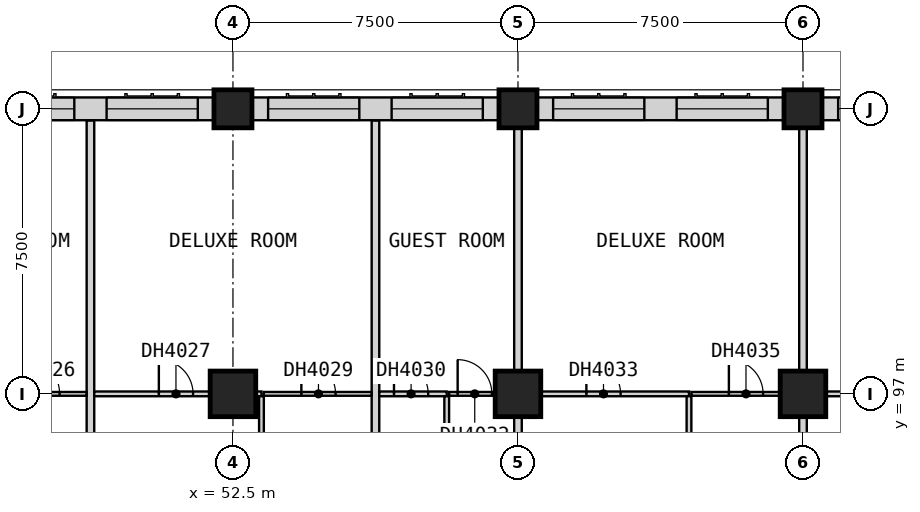
"""IFC4 building model, lengths in metres.
Left out: names, types, materials, properties, quantities, classifications, styles, units other than length and angle.
Written with IfcOpenShell. Run it as: python <this file> out.ifc"""

import sys

from ifc_helpers import new_model, si_unit, direction, frame, frame_2d, origin, origin_2d, place, context, subcontext, project, spatial, rectangle, extrude, element, fill, save


model = new_model("IFC4")
c1 = context("Model", 3, precision=1e-05, world=origin(), true_north=direction((0.0, 1.0)))
c2 = subcontext(c1, "Body", "Model", "MODEL_VIEW")
j1 = project(units=[si_unit("LENGTHUNIT", "METRE"), si_unit("PLANEANGLEUNIT", "RADIAN")], contexts=[c1])
p1 = place(None, origin())
s1 = spatial("IfcSite", under=j1, at=p1, CompositionType="ELEMENT")
p2 = place(p1, origin())
s2 = spatial("IfcBuilding", under=s1, at=p2, CompositionType="ELEMENT")
p3 = place(p2, frame((0.0, 0.0, 44.8)))
s3 = spatial("IfcBuildingStorey", under=s2, at=p3, CompositionType="ELEMENT", Elevation=44.8)
p4 = place(p3, frame((52.5, 97.0, 0.0), z_axis=(0.0, 0.0, 1.0), x_axis=(1.0, 0.0, 0.0)))
e1 = element("IfcColumn", 1, at=p4, inside=s3, PredefinedType="COLUMN", context=c2, shape_type="SweptSolid", body=[
    extrude(rectangle(XDim=1.2, YDim=1.2, at=origin_2d()), origin(), (0.0, 0.0, 1.0), 3.6),
])
p5 = place(p3, frame((52.5, 104.5, 0.0), z_axis=(0.0, 0.0, 1.0), x_axis=(1.0, 0.0, 0.0)))
e2 = element("IfcColumn", 2, at=p5, inside=s3, PredefinedType="COLUMN", context=c2, shape_type="SweptSolid", body=[
    extrude(rectangle(XDim=1.0, YDim=1.0, at=origin_2d()), origin(), (0.0, 0.0, 1.0), 3.6),
])
p6 = place(p3, frame((60.0, 97.0, 0.0), z_axis=(0.0, 0.0, 1.0), x_axis=(1.0, 0.0, 0.0)))
e3 = element("IfcColumn", 3, at=p6, inside=s3, PredefinedType="COLUMN", context=c2, shape_type="SweptSolid", body=[
    extrude(rectangle(XDim=1.2, YDim=1.2, at=origin_2d()), origin(), (0.0, 0.0, 1.0), 3.6),
])
p7 = place(p3, frame((60.0, 104.5, 0.0), z_axis=(0.0, 0.0, 1.0), x_axis=(1.0, 0.0, 0.0)))
e4 = element("IfcColumn", 4, at=p7, inside=s3, PredefinedType="COLUMN", context=c2, shape_type="SweptSolid", body=[
    extrude(rectangle(XDim=1.0, YDim=1.0, at=origin_2d()), origin(), (0.0, 0.0, 1.0), 3.6),
])
p8 = place(p3, frame((67.5, 97.0, 0.0), z_axis=(0.0, 0.0, 1.0), x_axis=(1.0, 0.0, 0.0)))
e5 = element("IfcColumn", 5, at=p8, inside=s3, PredefinedType="COLUMN", context=c2, shape_type="SweptSolid", body=[
    extrude(rectangle(XDim=1.2, YDim=1.2, at=origin_2d()), origin(), (0.0, 0.0, 1.0), 3.6),
])
p9 = place(p3, frame((67.5, 104.5, 0.0), z_axis=(0.0, 0.0, 1.0), x_axis=(1.0, 0.0, 0.0)))
e6 = element("IfcColumn", 6, at=p9, inside=s3, PredefinedType="COLUMN", context=c2, shape_type="SweptSolid", body=[
    extrude(rectangle(XDim=1.0, YDim=1.0, at=origin_2d()), origin(), (0.0, 0.0, 1.0), 3.6),
])
p10 = place(p3, frame((74.0, 104.5, 0.0), z_axis=(0.0, 0.0, 1.0), x_axis=(-1.0, 0.0, 0.0)))
e7 = element("IfcWall", 7, at=p10, inside=s3, PredefinedType="SOLIDWALL", context=c2, shape_type="SweptSolid", body=[
    extrude(rectangle(XDim=6.0, YDim=0.6, at=frame_2d((3.0, 0.0))), origin(), (0.0, 0.0, 1.0), 2.85),
])
p11 = place(p10, frame((3.175, 0.0, 0.8)))
e8 = element("IfcOpeningElement", 8, at=p11, cuts=e7, PredefinedType="OPENING", context=c2, shape_type="SweptSolid", body=[
    extrude(rectangle(XDim=2.4, YDim=1.8, at=frame_2d((1.2, 0.9))), frame((0.0, 0.31, 0.0), z_axis=(0.0, -1.0, 0.0), x_axis=(1.0, 0.0, 0.0)), (0.0, 0.0, 1.0), 0.62),
])
p12 = place(p10, frame((0.175, 0.0, 0.8)))
e9 = element("IfcOpeningElement", 9, at=p12, cuts=e7, PredefinedType="OPENING", context=c2, shape_type="SweptSolid", body=[
    extrude(rectangle(XDim=2.4, YDim=1.8, at=frame_2d((1.2, 0.9))), frame((0.0, 0.31, 0.0), z_axis=(0.0, -1.0, 0.0), x_axis=(1.0, 0.0, 0.0)), (0.0, 0.0, 1.0), 0.62),
])
p13 = place(p3, frame((67.0, 104.5, 0.0), z_axis=(0.0, 0.0, 1.0), x_axis=(-1.0, 0.0, 0.0)))
e10 = element("IfcWall", 10, at=p13, inside=s3, PredefinedType="SOLIDWALL", context=c2, shape_type="SweptSolid", body=[
    extrude(rectangle(XDim=6.5, YDim=0.6, at=frame_2d((3.25, 0.0))), origin(), (0.0, 0.0, 1.0), 2.85),
])
p14 = place(p13, frame((3.675, 0.0, 0.8)))
e11 = element("IfcOpeningElement", 11, at=p14, cuts=e10, PredefinedType="OPENING", context=c2, shape_type="SweptSolid", body=[
    extrude(rectangle(XDim=2.4, YDim=1.8, at=frame_2d((1.2, 0.9))), frame((0.0, 0.31, 0.0), z_axis=(0.0, -1.0, 0.0), x_axis=(1.0, 0.0, 0.0)), (0.0, 0.0, 1.0), 0.62),
])
p15 = place(p13, frame((0.425, 0.0, 0.8)))
e12 = element("IfcOpeningElement", 12, at=p15, cuts=e10, PredefinedType="OPENING", context=c2, shape_type="SweptSolid", body=[
    extrude(rectangle(XDim=2.4, YDim=1.8, at=frame_2d((1.2, 0.9))), frame((0.0, 0.31, 0.0), z_axis=(0.0, -1.0, 0.0), x_axis=(1.0, 0.0, 0.0)), (0.0, 0.0, 1.0), 0.62),
])
p16 = place(p3, frame((59.5, 104.5, 0.0), z_axis=(0.0, 0.0, 1.0), x_axis=(-1.0, 0.0, 0.0)))
e13 = element("IfcWall", 13, at=p16, inside=s3, PredefinedType="SOLIDWALL", context=c2, shape_type="SweptSolid", body=[
    extrude(rectangle(XDim=6.5, YDim=0.6, at=frame_2d((3.25, 0.0))), origin(), (0.0, 0.0, 1.0), 2.85),
])
p17 = place(p16, frame((3.675, 0.0, 0.8)))
e14 = element("IfcOpeningElement", 14, at=p17, cuts=e13, PredefinedType="OPENING", context=c2, shape_type="SweptSolid", body=[
    extrude(rectangle(XDim=2.4, YDim=1.8, at=frame_2d((1.2, 0.9))), frame((0.0, 0.31, 0.0), z_axis=(0.0, -1.0, 0.0), x_axis=(1.0, 0.0, 0.0)), (0.0, 0.0, 1.0), 0.62),
])
p18 = place(p16, frame((0.425, 0.0, 0.8)))
e15 = element("IfcOpeningElement", 15, at=p18, cuts=e13, PredefinedType="OPENING", context=c2, shape_type="SweptSolid", body=[
    extrude(rectangle(XDim=2.4, YDim=1.8, at=frame_2d((1.2, 0.9))), frame((0.0, 0.31, 0.0), z_axis=(0.0, -1.0, 0.0), x_axis=(1.0, 0.0, 0.0)), (0.0, 0.0, 1.0), 0.62),
])
p19 = place(p3, frame((52.0, 104.5, 0.0), z_axis=(0.0, 0.0, 1.0), x_axis=(-1.0, 0.0, 0.0)))
e16 = element("IfcWall", 16, at=p19, inside=s3, PredefinedType="SOLIDWALL", context=c2, shape_type="SweptSolid", body=[
    extrude(rectangle(XDim=6.5, YDim=0.6, at=frame_2d((3.25, 0.0))), origin(), (0.0, 0.0, 1.0), 2.85),
])
p20 = place(p19, frame((3.675, 0.0, 0.8)))
e17 = element("IfcOpeningElement", 17, at=p20, cuts=e16, PredefinedType="OPENING", context=c2, shape_type="SweptSolid", body=[
    extrude(rectangle(XDim=2.4, YDim=1.8, at=frame_2d((1.2, 0.9))), frame((0.0, 0.31, 0.0), z_axis=(0.0, -1.0, 0.0), x_axis=(1.0, 0.0, 0.0)), (0.0, 0.0, 1.0), 0.62),
])
p21 = place(p19, frame((0.425, 0.0, 0.8)))
e18 = element("IfcOpeningElement", 18, at=p21, cuts=e16, PredefinedType="OPENING", context=c2, shape_type="SweptSolid", body=[
    extrude(rectangle(XDim=2.4, YDim=1.8, at=frame_2d((1.2, 0.9))), frame((0.0, 0.31, 0.0), z_axis=(0.0, -1.0, 0.0), x_axis=(1.0, 0.0, 0.0)), (0.0, 0.0, 1.0), 0.62),
])
for number, where, z_axis, x_axis in (
    (19, (48.75, 92.475, 0.0), (0.0, 0.0, 1.0), (0.0, 1.0, 0.0)),
    (20, (56.25, 92.475, 0.0), (0.0, 0.0, 1.0), (0.0, 1.0, 0.0)),
):
    element("IfcWall", number, at=place(p3, frame(where, z_axis=z_axis, x_axis=x_axis)), inside=s3, PredefinedType="PARTITIONING", context=c2, shape_type="SweptSolid", body=[
        extrude(rectangle(XDim=11.715, YDim=0.2, at=frame_2d((5.857, 0.0))), origin(), (0.0, 0.0, 1.0), 3.35),
    ])
for number, where, z_axis, x_axis in (
    (21, (60.0, 92.475, 0.0), (0.0, 0.0, 1.0), (0.0, 1.0, 0.0)),
    (22, (67.5, 92.475, 0.0), (0.0, 0.0, 1.0), (0.0, 1.0, 0.0)),
):
    element("IfcWall", number, at=place(p3, frame(where, z_axis=z_axis, x_axis=x_axis)), inside=s3, PredefinedType="PARTITIONING", context=c2, shape_type="SweptSolid", body=[
        extrude(rectangle(XDim=12.525, YDim=0.2, at=frame_2d((6.262, 0.0))), origin(), (0.0, 0.0, 1.0), 3.35),
    ])
p22 = place(p3, frame((46.188, 97.0, 0.0), z_axis=(0.0, 0.0, 1.0), x_axis=(1.0, 0.0, 0.0)))
e23 = element("IfcWall", 23, at=p22, inside=s3, PredefinedType="PARTITIONING", context=c2, shape_type="SweptSolid", body=[
    extrude(rectangle(XDim=2.462, YDim=0.1, at=frame_2d((1.231, 0.0))), origin(), (0.0, 0.0, 1.0), 3.35),
])
p23 = place(p22, frame((0.75, 0.0, 0.0)))
e24 = element("IfcOpeningElement", 24, at=p23, cuts=e23, PredefinedType="OPENING", context=c2, shape_type="SweptSolid", body=[
    extrude(rectangle(XDim=1.0, YDim=2.1, at=frame_2d((0.5, 1.05))), frame((0.0, 0.06, 0.0), z_axis=(0.0, -1.0, 0.0), x_axis=(1.0, 0.0, 0.0)), (0.0, 0.0, 1.0), 0.12),
])
p24 = place(p3, frame((53.312, 97.0, 0.0), z_axis=(0.0, 0.0, 1.0), x_axis=(1.0, 0.0, 0.0)))
e25 = element("IfcWall", 25, at=p24, inside=s3, PredefinedType="PARTITIONING", context=c2, shape_type="SweptSolid", body=[
    extrude(rectangle(XDim=2.837, YDim=0.1, at=frame_2d((1.419, 0.0))), origin(), (0.0, 0.0, 1.0), 3.35),
])
p25 = place(p24, frame((0.988, 0.0, 0.0)))
e26 = element("IfcOpeningElement", 26, at=p25, cuts=e25, PredefinedType="OPENING", context=c2, shape_type="SweptSolid", body=[
    extrude(rectangle(XDim=0.9, YDim=2.1, at=frame_2d((0.45, 1.05))), frame((0.0, 0.06, 0.0), z_axis=(0.0, -1.0, 0.0), x_axis=(1.0, 0.0, 0.0)), (0.0, 0.0, 1.0), 0.12),
])
p26 = place(p3, frame((58.188, 97.0, 0.0), z_axis=(0.0, 0.0, 1.0), x_axis=(1.0, 0.0, 0.0)))
e27 = element("IfcWall", 27, at=p26, inside=s3, PredefinedType="PARTITIONING", context=c2, shape_type="SweptSolid", body=[
    extrude(rectangle(XDim=1.712, YDim=0.1, at=frame_2d((0.856, 0.0))), origin(), (0.0, 0.0, 1.0), 3.35),
])
p27 = place(p26, frame((0.225, 0.0, 0.0)))
e28 = element("IfcOpeningElement", 28, at=p27, cuts=e27, PredefinedType="OPENING", context=c2, shape_type="SweptSolid", body=[
    extrude(rectangle(XDim=0.9, YDim=2.1, at=frame_2d((0.45, 1.05))), frame((0.0, 0.06, 0.0), z_axis=(0.0, -1.0, 0.0), x_axis=(1.0, 0.0, 0.0)), (0.0, 0.0, 1.0), 0.12),
])
p28 = place(p3, frame((64.562, 97.0, 0.0), z_axis=(0.0, 0.0, 1.0), x_axis=(1.0, 0.0, 0.0)))
e29 = element("IfcWall", 29, at=p28, inside=s3, PredefinedType="PARTITIONING", context=c2, shape_type="SweptSolid", body=[
    extrude(rectangle(XDim=2.837, YDim=0.1, at=frame_2d((1.419, 0.0))), origin(), (0.0, 0.0, 1.0), 3.35),
])
p29 = place(p28, frame((0.988, 0.0, 0.0)))
e30 = element("IfcOpeningElement", 30, at=p29, cuts=e29, PredefinedType="OPENING", context=c2, shape_type="SweptSolid", body=[
    extrude(rectangle(XDim=0.9, YDim=2.1, at=frame_2d((0.45, 1.05))), frame((0.0, 0.06, 0.0), z_axis=(0.0, -1.0, 0.0), x_axis=(1.0, 0.0, 0.0)), (0.0, 0.0, 1.0), 0.12),
])
p30 = place(p3, frame((48.85, 97.0, 0.0), z_axis=(0.0, 0.0, 1.0), x_axis=(1.0, 0.0, 0.0)))
e31 = element("IfcWall", 31, at=p30, inside=s3, PredefinedType="PARTITIONING", context=c2, shape_type="SweptSolid", body=[
    extrude(rectangle(XDim=4.4, YDim=0.125, at=frame_2d((2.2, 0.0))), origin(), (0.0, 0.0, 1.0), 3.35),
])
p31 = place(p30, frame((1.7, 0.0, 0.0)))
e32 = element("IfcOpeningElement", 32, at=p31, cuts=e31, PredefinedType="OPENING", context=c2, shape_type="SweptSolid", body=[
    extrude(rectangle(XDim=0.9, YDim=2.1, at=frame_2d((0.45, 1.05))), frame((0.0, 0.073, 0.0), z_axis=(0.0, -1.0, 0.0), x_axis=(1.0, 0.0, 0.0)), (0.0, 0.0, 1.0), 0.145),
])
p32 = place(p3, frame((56.35, 97.0, 0.0), z_axis=(0.0, 0.0, 1.0), x_axis=(1.0, 0.0, 0.0)))
e33 = element("IfcWall", 33, at=p32, inside=s3, PredefinedType="PARTITIONING", context=c2, shape_type="SweptSolid", body=[
    extrude(rectangle(XDim=1.775, YDim=0.125, at=frame_2d((0.887, 0.0))), origin(), (0.0, 0.0, 1.0), 3.35),
])
p33 = place(p32, frame((0.387, 0.0, 0.0)))
e34 = element("IfcOpeningElement", 34, at=p33, cuts=e33, PredefinedType="OPENING", context=c2, shape_type="SweptSolid", body=[
    extrude(rectangle(XDim=0.9, YDim=2.1, at=frame_2d((0.45, 1.05))), frame((0.0, 0.073, 0.0), z_axis=(0.0, -1.0, 0.0), x_axis=(1.0, 0.0, 0.0)), (0.0, 0.0, 1.0), 0.145),
])
p34 = place(p3, frame((60.1, 97.0, 0.0), z_axis=(0.0, 0.0, 1.0), x_axis=(1.0, 0.0, 0.0)))
e35 = element("IfcWall", 35, at=p34, inside=s3, PredefinedType="PARTITIONING", context=c2, shape_type="SweptSolid", body=[
    extrude(rectangle(XDim=4.4, YDim=0.125, at=frame_2d((2.2, 0.0))), origin(), (0.0, 0.0, 1.0), 3.35),
])
p35 = place(p34, frame((1.7, 0.0, 0.0)))
e36 = element("IfcOpeningElement", 36, at=p35, cuts=e35, PredefinedType="OPENING", context=c2, shape_type="SweptSolid", body=[
    extrude(rectangle(XDim=0.9, YDim=2.1, at=frame_2d((0.45, 1.05))), frame((0.0, 0.073, 0.0), z_axis=(0.0, -1.0, 0.0), x_axis=(1.0, 0.0, 0.0)), (0.0, 0.0, 1.0), 0.145),
])
p36 = place(p3, frame((67.6, 97.0, 0.0), z_axis=(0.0, 0.0, 1.0), x_axis=(1.0, 0.0, 0.0)))
e37 = element("IfcWall", 37, at=p36, inside=s3, PredefinedType="PARTITIONING", context=c2, shape_type="SweptSolid", body=[
    extrude(rectangle(XDim=4.4, YDim=0.125, at=frame_2d((2.2, 0.0))), origin(), (0.0, 0.0, 1.0), 3.35),
])
p37 = place(p36, frame((1.7, 0.0, 0.0)))
e38 = element("IfcOpeningElement", 38, at=p37, cuts=e37, PredefinedType="OPENING", context=c2, shape_type="SweptSolid", body=[
    extrude(rectangle(XDim=0.9, YDim=2.1, at=frame_2d((0.45, 1.05))), frame((0.0, 0.073, 0.0), z_axis=(0.0, -1.0, 0.0), x_axis=(1.0, 0.0, 0.0)), (0.0, 0.0, 1.0), 0.145),
])
for number, where, z_axis, x_axis in (
    (39, (53.25, 92.475, 0.0), (0.0, 0.0, 1.0), (0.0, 1.0, 0.0)),
    (40, (58.125, 92.475, 0.0), (0.0, 0.0, 1.0), (0.0, 1.0, 0.0)),
    (41, (64.5, 92.475, 0.0), (0.0, 0.0, 1.0), (0.0, 1.0, 0.0)),
):
    element("IfcWall", number, at=place(p3, frame(where, z_axis=z_axis, x_axis=x_axis)), inside=s3, PredefinedType="PARTITIONING", context=c2, shape_type="SweptSolid", body=[
        extrude(rectangle(XDim=4.462, YDim=0.125, at=frame_2d((2.231, 0.0))), origin(), (0.0, 0.0, 1.0), 3.35),
    ])
p38 = place(p11, origin())
e42 = element("IfcWindow", 42, at=p38, inside=s3, PartitioningType="SINGLE_PANEL", PredefinedType="WINDOW", context=c2, shape_type="SweptSolid", body=[
    extrude(rectangle(XDim=2.4, YDim=1.8, at=frame_2d((1.2, 0.9))), frame((0.0, -0.07, 0.0), z_axis=(0.0, -1.0, 0.0), x_axis=(1.0, 0.0, 0.0)), (0.0, 0.0, 1.0), 0.06),
])
fill(e8, e42)
p39 = place(p14, origin())
e43 = element("IfcWindow", 43, at=p39, inside=s3, PartitioningType="SINGLE_PANEL", PredefinedType="WINDOW", context=c2, shape_type="SweptSolid", body=[
    extrude(rectangle(XDim=2.4, YDim=1.8, at=frame_2d((1.2, 0.9))), frame((0.0, -0.07, 0.0), z_axis=(0.0, -1.0, 0.0), x_axis=(1.0, 0.0, 0.0)), (0.0, 0.0, 1.0), 0.06),
])
fill(e11, e43)
p40 = place(p15, origin())
e44 = element("IfcWindow", 44, at=p40, inside=s3, PartitioningType="SINGLE_PANEL", PredefinedType="WINDOW", context=c2, shape_type="SweptSolid", body=[
    extrude(rectangle(XDim=2.4, YDim=1.8, at=frame_2d((1.2, 0.9))), frame((0.0, -0.07, 0.0), z_axis=(0.0, -1.0, 0.0), x_axis=(1.0, 0.0, 0.0)), (0.0, 0.0, 1.0), 0.06),
])
fill(e12, e44)
p41 = place(p17, origin())
e45 = element("IfcWindow", 45, at=p41, inside=s3, PartitioningType="SINGLE_PANEL", PredefinedType="WINDOW", context=c2, shape_type="SweptSolid", body=[
    extrude(rectangle(XDim=2.4, YDim=1.8, at=frame_2d((1.2, 0.9))), frame((0.0, -0.07, 0.0), z_axis=(0.0, -1.0, 0.0), x_axis=(1.0, 0.0, 0.0)), (0.0, 0.0, 1.0), 0.06),
])
fill(e14, e45)
p42 = place(p18, origin())
e46 = element("IfcWindow", 46, at=p42, inside=s3, PartitioningType="SINGLE_PANEL", PredefinedType="WINDOW", context=c2, shape_type="SweptSolid", body=[
    extrude(rectangle(XDim=2.4, YDim=1.8, at=frame_2d((1.2, 0.9))), frame((0.0, -0.07, 0.0), z_axis=(0.0, -1.0, 0.0), x_axis=(1.0, 0.0, 0.0)), (0.0, 0.0, 1.0), 0.06),
])
fill(e15, e46)
p43 = place(p20, origin())
e47 = element("IfcWindow", 47, at=p43, inside=s3, PartitioningType="SINGLE_PANEL", PredefinedType="WINDOW", context=c2, shape_type="SweptSolid", body=[
    extrude(rectangle(XDim=2.4, YDim=1.8, at=frame_2d((1.2, 0.9))), frame((0.0, -0.07, 0.0), z_axis=(0.0, -1.0, 0.0), x_axis=(1.0, 0.0, 0.0)), (0.0, 0.0, 1.0), 0.06),
])
fill(e17, e47)
p44 = place(p21, origin())
e48 = element("IfcWindow", 48, at=p44, inside=s3, PartitioningType="SINGLE_PANEL", PredefinedType="WINDOW", context=c2, shape_type="SweptSolid", body=[
    extrude(rectangle(XDim=2.4, YDim=1.8, at=frame_2d((1.2, 0.9))), frame((0.0, -0.07, 0.0), z_axis=(0.0, -1.0, 0.0), x_axis=(1.0, 0.0, 0.0)), (0.0, 0.0, 1.0), 0.06),
])
fill(e18, e48)
p45 = place(p23, origin())
e49 = element("IfcDoor", 49, at=p45, inside=s3, OperationType="SINGLE_SWING_RIGHT", PredefinedType="DOOR", context=c2, shape_type="SweptSolid", body=[
    extrude(rectangle(XDim=1.0, YDim=2.1, at=frame_2d((0.5, 1.05))), frame((0.0, 0.025, 0.0), z_axis=(0.0, -1.0, 0.0), x_axis=(1.0, 0.0, 0.0)), (0.0, 0.0, 1.0), 0.05),
])
fill(e24, e49)
p46 = place(p31, origin())
e50 = element("IfcDoor", 50, at=p46, inside=s3, OperationType="SINGLE_SWING_RIGHT", PredefinedType="DOOR", context=c2, shape_type="SweptSolid", body=[
    extrude(rectangle(XDim=0.9, YDim=2.1, at=frame_2d((0.45, 1.05))), frame((0.0, 0.025, 0.0), z_axis=(0.0, -1.0, 0.0), x_axis=(1.0, 0.0, 0.0)), (0.0, 0.0, 1.0), 0.05),
])
fill(e32, e50)
p47 = place(p25, origin())
e51 = element("IfcDoor", 51, at=p47, inside=s3, OperationType="SINGLE_SWING_RIGHT", PredefinedType="DOOR", context=c2, shape_type="SweptSolid", body=[
    extrude(rectangle(XDim=0.9, YDim=2.1, at=frame_2d((0.45, 1.05))), frame((0.0, 0.025, 0.0), z_axis=(0.0, -1.0, 0.0), x_axis=(1.0, 0.0, 0.0)), (0.0, 0.0, 1.0), 0.05),
])
fill(e26, e51)
p48 = place(p33, origin())
e52 = element("IfcDoor", 52, at=p48, inside=s3, OperationType="SINGLE_SWING_RIGHT", PredefinedType="DOOR", context=c2, shape_type="SweptSolid", body=[
    extrude(rectangle(XDim=0.9, YDim=2.1, at=frame_2d((0.45, 1.05))), frame((0.0, 0.025, 0.0), z_axis=(0.0, -1.0, 0.0), x_axis=(1.0, 0.0, 0.0)), (0.0, 0.0, 1.0), 0.05),
])
fill(e34, e52)
p49 = place(p27, origin())
e53 = element("IfcDoor", 53, at=p49, inside=s3, OperationType="SINGLE_SWING_RIGHT", PredefinedType="DOOR", context=c2, shape_type="SweptSolid", body=[
    extrude(rectangle(XDim=0.9, YDim=2.1, at=frame_2d((0.45, 1.05))), frame((0.0, 0.025, 0.0), z_axis=(0.0, -1.0, 0.0), x_axis=(1.0, 0.0, 0.0)), (0.0, 0.0, 1.0), 0.05),
])
fill(e28, e53)
p50 = place(p35, origin())
e54 = element("IfcDoor", 54, at=p50, inside=s3, OperationType="SINGLE_SWING_RIGHT", PredefinedType="DOOR", context=c2, shape_type="SweptSolid", body=[
    extrude(rectangle(XDim=0.9, YDim=2.1, at=frame_2d((0.45, 1.05))), frame((0.0, 0.025, 0.0), z_axis=(0.0, -1.0, 0.0), x_axis=(1.0, 0.0, 0.0)), (0.0, 0.0, 1.0), 0.05),
])
fill(e36, e54)
p51 = place(p29, origin())
e55 = element("IfcDoor", 55, at=p51, inside=s3, OperationType="SINGLE_SWING_RIGHT", PredefinedType="DOOR", context=c2, shape_type="SweptSolid", body=[
    extrude(rectangle(XDim=0.9, YDim=2.1, at=frame_2d((0.45, 1.05))), frame((0.0, 0.025, 0.0), z_axis=(0.0, -1.0, 0.0), x_axis=(1.0, 0.0, 0.0)), (0.0, 0.0, 1.0), 0.05),
])
fill(e30, e55)
save(model, sys.argv[1])
